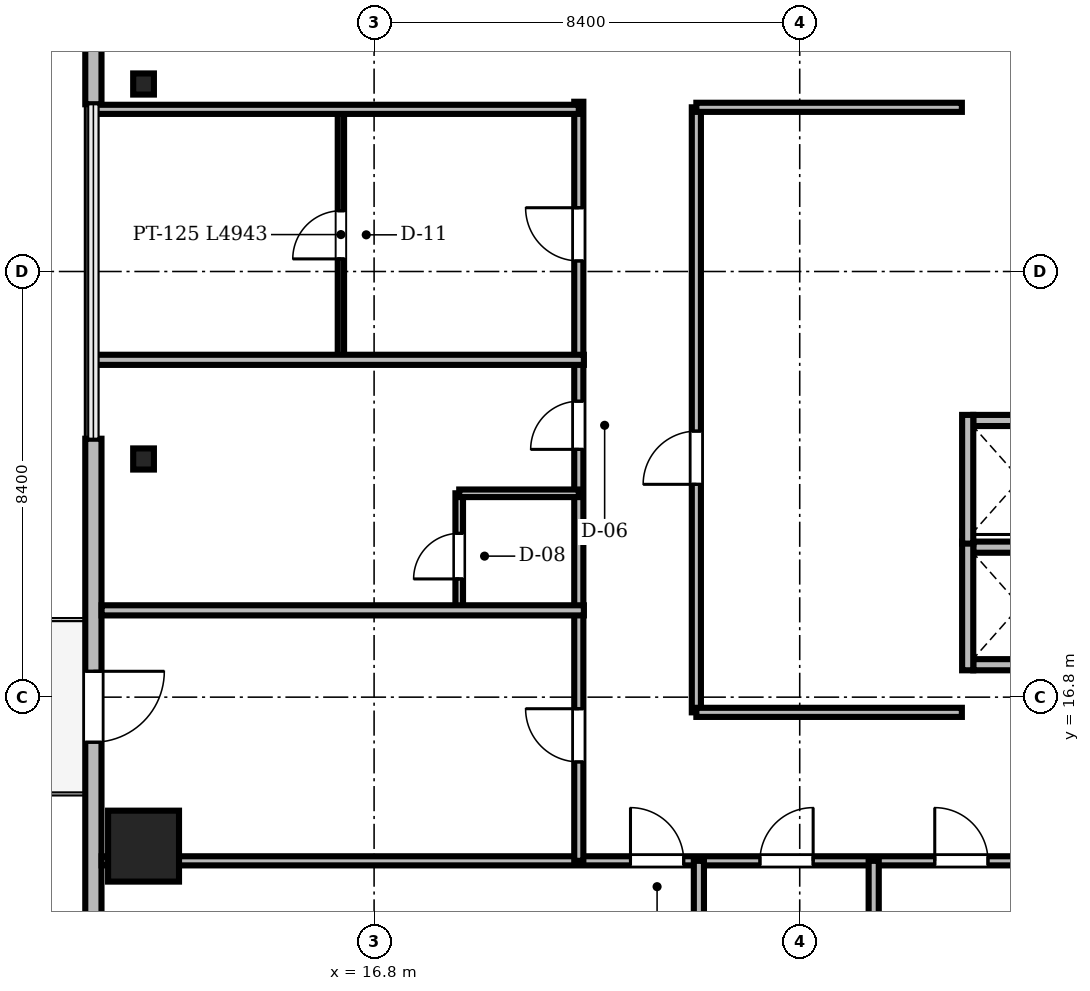
"""IFC4 building model, lengths in metres.
Left out: names, types, materials, properties, quantities, classifications, styles, units other than length and angle.
Written with IfcOpenShell. Run it as: python <this file> out.ifc"""

import sys

from ifc_helpers import new_model, si_unit, direction, frame, frame_2d, origin, origin_2d, place, context, subcontext, project, spatial, rectangle, i_section, extrude, source, transform, mapped, element, fill, save


model = new_model("IFC4")
c1 = context("Model", 3, precision=1e-05, world=origin(), true_north=direction((0.0, 1.0)))
c2 = subcontext(c1, "Body", "Model", "MODEL_VIEW")
j1 = project(units=[si_unit("LENGTHUNIT", "METRE"), si_unit("PLANEANGLEUNIT", "RADIAN")], contexts=[c1])
p1 = place(None, origin())
s1 = spatial("IfcSite", under=j1, at=p1, CompositionType="ELEMENT")
p2 = place(p1, origin())
s2 = spatial("IfcBuilding", under=s1, at=p2, CompositionType="ELEMENT")
p3 = place(p2, frame((0.0, 0.0, 222.3)))
s3 = spatial("IfcBuildingStorey", under=s2, at=p3, CompositionType="ELEMENT", Elevation=222.3)
m1 = source(origin(), c2, "Body", "SweptSolid", [
    extrude(rectangle(XDim=1.4, YDim=1.4, at=origin_2d()), origin(), (0.0, 0.0, 1.0), 3.53),
])
p4 = place(p3, frame((12.25, 13.86, 0.0), z_axis=(0.0, 0.0, 1.0), x_axis=(1.0, 0.0, 0.0)))
e1 = element("IfcColumn", 1, at=p4, inside=s3, PredefinedType="COLUMN", context=c2, shape_type="MappedRepresentation", body=[
    mapped(m1, transform((0.0, 0.0, 0.0), scale=1.0)),
])
m2 = source(origin(), c2, "Body", "SweptSolid", [
    extrude(i_section(OverallWidth=0.409, OverallDepth=0.417, WebThickness=0.021, FlangeThickness=0.033, FilletRadius=0.015, at=origin_2d()), origin(), (0.0, 0.0, 1.0), 3.53),
])
for number, where, z_axis, x_axis in (
    (2, (12.25, 28.9, 0.0), (0.0, 0.0, 1.0), (1.0, 0.0, 0.0)),
    (3, (12.25, 21.5, 0.0), (0.0, 0.0, 1.0), (1.0, 0.0, 0.0)),
):
    element("IfcColumn", number, at=place(p3, frame(where, z_axis=z_axis, x_axis=x_axis)), inside=s3, PredefinedType="COLUMN", context=c2, shape_type="MappedRepresentation", body=[
        mapped(m2, transform((0.0, 0.0, 0.0), scale=1.0)),
    ])
m3 = source(origin(), c2, "Body", "SweptSolid", [
    extrude(rectangle(XDim=15.6, YDim=0.32, at=frame_2d((7.8, 0.0))), origin(), (0.0, 0.0, 1.0), 3.53),
])
p5 = place(p3, frame((11.26, 44.1, 0.0), z_axis=(0.0, 0.0, 1.0), x_axis=(0.0, -1.0, 0.0)))
e4 = element("IfcWall", 4, at=p5, inside=s3, PredefinedType="SOLIDWALL", context=c2, shape_type="MappedRepresentation", body=[
    mapped(m3, transform((0.0, 0.0, 0.0), scale=1.0)),
])
m4 = source(origin(), c2, "Body", "SweptSolid", [
    extrude(rectangle(XDim=2.2, YDim=2.4, at=frame_2d((1.1, 1.2))), frame((0.0, 0.17, 0.0), z_axis=(0.0, -1.0, 0.0), x_axis=(1.0, 0.0, 0.0)), (0.0, 0.0, 1.0), 0.34),
])
p6 = place(p5, frame((3.005, 0.0, 0.72)))
e5 = element("IfcOpeningElement", 5, at=p6, cuts=e4, PredefinedType="OPENING", context=c2, shape_type="MappedRepresentation", body=[
    mapped(m4, transform((0.0, 0.0, 0.0), scale=1.0)),
])
m5 = source(origin(), c2, "Body", "SweptSolid", [
    extrude(rectangle(XDim=15.6, YDim=0.32, at=frame_2d((7.8, 0.0))), origin(), (0.0, 0.0, 1.0), 3.53),
])
p7 = place(p3, frame((11.26, 21.9, 0.0), z_axis=(0.0, 0.0, 1.0), x_axis=(0.0, -1.0, 0.0)))
e6 = element("IfcWall", 6, at=p7, inside=s3, PredefinedType="SOLIDWALL", context=c2, shape_type="MappedRepresentation", body=[
    mapped(m5, transform((0.0, 0.0, 0.0), scale=1.0)),
])
m6 = source(origin(), c2, "Body", "SweptSolid", [
    extrude(rectangle(XDim=1.4, YDim=2.3, at=frame_2d((0.7, 1.15))), frame((0.0, 0.17, 0.0), z_axis=(0.0, -1.0, 0.0), x_axis=(1.0, 0.0, 0.0)), (0.0, 0.0, 1.0), 0.34),
])
p8 = place(p7, frame((4.59, 0.0, 0.0)))
e7 = element("IfcOpeningElement", 7, at=p8, cuts=e6, PredefinedType="OPENING", context=c2, shape_type="MappedRepresentation", body=[
    mapped(m6, transform((0.0, 0.0, 0.0), scale=1.0)),
])
p9 = place(p7, frame((10.395, 0.0, 0.72)))
e8 = element("IfcOpeningElement", 8, at=p9, cuts=e6, PredefinedType="OPENING", context=c2, shape_type="MappedRepresentation", body=[
    mapped(m4, transform((0.0, 0.0, 0.0), scale=1.0)),
])
m7 = source(origin(), c2, "Body", "SweptSolid", [
    extrude(rectangle(XDim=1.85, YDim=0.22, at=frame_2d((0.925, 0.0))), origin(), (0.0, 0.0, 1.0), 2.972),
])
p10 = place(p3, frame((28.625, 17.44, 0.0), z_axis=(0.0, 0.0, 1.0), x_axis=(1.0, 0.0, 0.0)))
e9 = element("IfcWall", 9, at=p10, inside=s3, PredefinedType="SOLIDWALL", context=c2, shape_type="MappedRepresentation", body=[
    mapped(m7, transform((0.0, 0.0, 0.0), scale=1.0)),
])
m8 = source(origin(), c2, "Body", "SweptSolid", [
    extrude(rectangle(XDim=1.85, YDim=0.22, at=frame_2d((0.925, 0.0))), origin(), (0.0, 0.0, 1.0), 3.53),
])
p11 = place(p3, frame((28.625, 19.76, 0.0), z_axis=(0.0, 0.0, 1.0), x_axis=(1.0, 0.0, 0.0)))
e10 = element("IfcWall", 10, at=p11, inside=s3, PredefinedType="SOLIDWALL", context=c2, shape_type="MappedRepresentation", body=[
    mapped(m8, transform((0.0, 0.0, 0.0), scale=1.0)),
])
m9 = source(origin(), c2, "Body", "SweptSolid", [
    extrude(rectangle(XDim=2.54, YDim=0.22, at=frame_2d((1.27, 0.0))), origin(), (0.0, 0.0, 1.0), 2.972),
])
p12 = place(p3, frame((28.515, 17.33, 0.0), z_axis=(0.0, 0.0, 1.0), x_axis=(0.0, 1.0, 0.0)))
e11 = element("IfcWall", 11, at=p12, inside=s3, PredefinedType="SOLIDWALL", context=c2, shape_type="MappedRepresentation", body=[
    mapped(m9, transform((0.0, 0.0, 0.0), scale=1.0)),
])
p13 = place(p3, frame((28.625, 22.26, 0.0), z_axis=(0.0, 0.0, 1.0), x_axis=(1.0, 0.0, 0.0)))
e12 = element("IfcWall", 12, at=p13, inside=s3, PredefinedType="SOLIDWALL", context=c2, shape_type="MappedRepresentation", body=[
    mapped(m8, transform((0.0, 0.0, 0.0), scale=1.0)),
])
m10 = source(origin(), c2, "Body", "SweptSolid", [
    extrude(rectangle(XDim=2.54, YDim=0.22, at=frame_2d((1.27, 0.0))), origin(), (0.0, 0.0, 1.0), 3.53),
])
p14 = place(p3, frame((28.515, 19.83, 0.0), z_axis=(0.0, 0.0, 1.0), x_axis=(0.0, 1.0, 0.0)))
e13 = element("IfcWall", 13, at=p14, inside=s3, PredefinedType="SOLIDWALL", context=c2, shape_type="MappedRepresentation", body=[
    mapped(m10, transform((0.0, 0.0, 0.0), scale=1.0)),
])
m11 = source(origin(), c2, "Body", "SweptSolid", [
    extrude(rectangle(XDim=46.156, YDim=0.18, at=frame_2d((23.078, 0.0))), origin(), (0.0, 0.0, 1.0), 2.772),
])
p15 = place(p3, frame((11.422, 13.57, 0.0), z_axis=(0.0, 0.0, 1.0), x_axis=(1.0, 0.0, 0.0)))
e14 = element("IfcWall", 14, at=p15, inside=s3, PredefinedType="PARTITIONING", context=c2, shape_type="MappedRepresentation", body=[
    mapped(m11, transform((0.0, 0.0, 0.0), scale=1.0)),
])
m12 = source(origin(), c2, "Body", "SweptSolid", [
    extrude(rectangle(XDim=1.05, YDim=2.2, at=frame_2d((0.525, 1.1))), frame((0.0, 0.1, 0.0), z_axis=(0.0, -1.0, 0.0), x_axis=(1.0, 0.0, 0.0)), (0.0, 0.0, 1.0), 0.2),
])
p16 = place(p15, frame((10.438, 0.0, 0.0)))
e15 = element("IfcOpeningElement", 15, at=p16, cuts=e14, PredefinedType="OPENING", context=c2, shape_type="MappedRepresentation", body=[
    mapped(m12, transform((0.0, 0.0, 0.0), scale=1.0)),
])
p17 = place(p15, frame((12.993, 0.0, 0.0)))
e16 = element("IfcOpeningElement", 16, at=p17, cuts=e14, PredefinedType="OPENING", context=c2, shape_type="MappedRepresentation", body=[
    mapped(m12, transform((0.0, 0.0, 0.0), scale=1.0)),
])
p18 = place(p15, frame((16.443, 0.0, 0.0)))
e17 = element("IfcOpeningElement", 17, at=p18, cuts=e14, PredefinedType="OPENING", context=c2, shape_type="MappedRepresentation", body=[
    mapped(m12, transform((0.0, 0.0, 0.0), scale=1.0)),
])
p19 = place(p15, frame((20.121, 0.0, 0.0)))
e18 = element("IfcOpeningElement", 18, at=p19, cuts=e14, PredefinedType="OPENING", context=c2, shape_type="MappedRepresentation", body=[
    mapped(m12, transform((0.0, 0.0, 0.0), scale=1.0)),
])
p20 = place(p15, frame((24.124, 0.0, 0.0)))
e19 = element("IfcOpeningElement", 19, at=p20, cuts=e14, PredefinedType="OPENING", context=c2, shape_type="MappedRepresentation", body=[
    mapped(m12, transform((0.0, 0.0, 0.0), scale=1.0)),
])
p21 = place(p15, frame((29.261, 0.0, 0.0)))
e20 = element("IfcOpeningElement", 20, at=p21, cuts=e14, PredefinedType="OPENING", context=c2, shape_type="MappedRepresentation", body=[
    mapped(m12, transform((0.0, 0.0, 0.0), scale=1.0)),
])
p22 = place(p15, frame((34.113, 0.0, 0.0)))
e21 = element("IfcOpeningElement", 21, at=p22, cuts=e14, PredefinedType="OPENING", context=c2, shape_type="MappedRepresentation", body=[
    mapped(m12, transform((0.0, 0.0, 0.0), scale=1.0)),
])
p23 = place(p15, frame((37.498, 0.0, 0.0)))
e22 = element("IfcOpeningElement", 22, at=p23, cuts=e14, PredefinedType="OPENING", context=c2, shape_type="MappedRepresentation", body=[
    mapped(m12, transform((0.0, 0.0, 0.0), scale=1.0)),
])
m13 = source(origin(), c2, "Body", "SweptSolid", [
    extrude(rectangle(XDim=14.98, YDim=0.18, at=frame_2d((7.49, 0.0))), origin(), (0.0, 0.0, 1.0), 2.972),
])
p24 = place(p3, frame((20.84, 13.57, 0.0), z_axis=(0.0, 0.0, 1.0), x_axis=(0.0, 1.0, 0.0)))
e23 = element("IfcWall", 23, at=p24, inside=s3, PredefinedType="PARTITIONING", context=c2, shape_type="MappedRepresentation", body=[
    mapped(m13, transform((0.0, 0.0, 0.0), scale=1.0)),
])
p25 = place(p24, frame((1.952, 0.0, 0.0)))
e24 = element("IfcOpeningElement", 24, at=p25, cuts=e23, PredefinedType="OPENING", context=c2, shape_type="MappedRepresentation", body=[
    mapped(m12, transform((0.0, 0.0, 0.0), scale=1.0)),
])
m14 = source(origin(), c2, "Body", "SweptSolid", [
    extrude(rectangle(XDim=0.95, YDim=2.15, at=frame_2d((0.475, 1.075))), frame((0.0, 0.1, 0.0), z_axis=(0.0, -1.0, 0.0), x_axis=(1.0, 0.0, 0.0)), (0.0, 0.0, 1.0), 0.2),
])
p26 = place(p24, frame((8.12, 0.0, 0.0)))
e25 = element("IfcOpeningElement", 25, at=p26, cuts=e23, PredefinedType="OPENING", context=c2, shape_type="MappedRepresentation", body=[
    mapped(m14, transform((0.0, 0.0, 0.0), scale=1.0)),
])
p27 = place(p24, frame((11.838, 0.0, 0.0)))
e26 = element("IfcOpeningElement", 26, at=p27, cuts=e23, PredefinedType="OPENING", context=c2, shape_type="MappedRepresentation", body=[
    mapped(m12, transform((0.0, 0.0, 0.0), scale=1.0)),
])
m15 = source(origin(), c2, "Body", "SweptSolid", [
    extrude(rectangle(XDim=11.94, YDim=0.18, at=frame_2d((5.97, 0.0))), origin(), (0.0, 0.0, 1.0), 2.972),
])
p28 = place(p3, frame((23.16, 16.5, 0.0), z_axis=(0.0, 0.0, 1.0), x_axis=(0.0, 1.0, 0.0)))
e27 = element("IfcWall", 27, at=p28, inside=s3, PredefinedType="PARTITIONING", context=c2, shape_type="MappedRepresentation", body=[
    mapped(m15, transform((0.0, 0.0, 0.0), scale=1.0)),
])
p29 = place(p28, frame((4.5, 0.0, 0.0)))
e28 = element("IfcOpeningElement", 28, at=p29, cuts=e27, PredefinedType="OPENING", context=c2, shape_type="MappedRepresentation", body=[
    mapped(m12, transform((0.0, 0.0, 0.0), scale=1.0)),
])
m16 = source(origin(), c2, "Body", "SweptSolid", [
    extrude(rectangle(XDim=4.943, YDim=0.125, at=frame_2d((2.471, 0.0))), origin(), (0.0, 0.0, 1.0), 2.972),
])
p30 = place(p3, frame((16.145, 23.457, 0.0), z_axis=(0.0, 0.0, 1.0), x_axis=(0.0, 1.0, 0.0)))
e29 = element("IfcWall", 29, at=p30, inside=s3, PredefinedType="PARTITIONING", context=c2, shape_type="MappedRepresentation", body=[
    mapped(m16, transform((0.0, 0.0, 0.0), scale=1.0)),
])
m17 = source(origin(), c2, "Body", "SweptSolid", [
    extrude(rectangle(XDim=0.95, YDim=2.15, at=frame_2d((0.475, 1.075))), frame((0.0, 0.073, 0.0), z_axis=(0.0, -1.0, 0.0), x_axis=(1.0, 0.0, 0.0)), (0.0, 0.0, 1.0), 0.145),
])
p31 = place(p30, frame((1.992, 0.0, 0.0)))
e30 = element("IfcOpeningElement", 30, at=p31, cuts=e29, PredefinedType="OPENING", context=c2, shape_type="MappedRepresentation", body=[
    mapped(m17, transform((0.0, 0.0, 0.0), scale=1.0)),
])
m18 = source(origin(), c2, "Body", "SweptSolid", [
    extrude(rectangle(XDim=2.29, YDim=0.15, at=frame_2d((1.145, 0.0))), origin(), (0.0, 0.0, 1.0), 2.972),
])
p32 = place(p3, frame((18.48, 18.533, 0.0), z_axis=(0.0, 0.0, 1.0), x_axis=(0.0, 1.0, 0.0)))
e31 = element("IfcWall", 31, at=p32, inside=s3, PredefinedType="PARTITIONING", context=c2, shape_type="MappedRepresentation", body=[
    mapped(m18, transform((0.0, 0.0, 0.0), scale=1.0)),
])
m19 = source(origin(), c2, "Body", "SweptSolid", [
    extrude(rectangle(XDim=0.9, YDim=2.1, at=frame_2d((0.45, 1.05))), frame((0.0, 0.085, 0.0), z_axis=(0.0, -1.0, 0.0), x_axis=(1.0, 0.0, 0.0)), (0.0, 0.0, 1.0), 0.17),
])
p33 = place(p32, frame((0.6, 0.0, 0.0)))
e32 = element("IfcOpeningElement", 32, at=p33, cuts=e31, PredefinedType="OPENING", context=c2, shape_type="MappedRepresentation", body=[
    mapped(m19, transform((0.0, 0.0, 0.0), scale=1.0)),
])
m20 = source(origin(), c2, "Body", "SweptSolid", [
    extrude(rectangle(XDim=11.448, YDim=0.2, at=frame_2d((5.724, 0.0))), origin(), (0.0, 0.0, 1.0), 2.772),
])
for number, where, z_axis, x_axis in (
    (33, (23.21, 2.122, 0.0), (0.0, 0.0, 1.0), (0.0, 1.0, 0.0)),
    (34, (26.66, 2.122, 0.0), (0.0, 0.0, 1.0), (0.0, 1.0, 0.0)),
):
    element("IfcWall", number, at=place(p3, frame(where, z_axis=z_axis, x_axis=x_axis)), inside=s3, PredefinedType="PARTITIONING", context=c2, shape_type="MappedRepresentation", body=[
        mapped(m20, transform((0.0, 0.0, 0.0), scale=1.0)),
    ])
m21 = source(origin(), c2, "Body", "SweptSolid", [
    extrude(rectangle(XDim=9.518, YDim=0.2, at=frame_2d((4.759, 0.0))), origin(), (0.0, 0.0, 1.0), 2.772),
])
p34 = place(p3, frame((11.422, 18.513, 0.0), z_axis=(0.0, 0.0, 1.0), x_axis=(1.0, 0.0, 0.0)))
e35 = element("IfcWall", 35, at=p34, inside=s3, PredefinedType="PARTITIONING", context=c2, shape_type="MappedRepresentation", body=[
    mapped(m21, transform((0.0, 0.0, 0.0), scale=1.0)),
])
m22 = source(origin(), c2, "Body", "SweptSolid", [
    extrude(rectangle(XDim=9.71, YDim=0.2, at=frame_2d((4.855, 0.0))), origin(), (0.0, 0.0, 1.0), 2.772),
])
p35 = place(p3, frame((11.23, 23.457, 0.0), z_axis=(0.0, 0.0, 1.0), x_axis=(1.0, 0.0, 0.0)))
e36 = element("IfcWall", 36, at=p35, inside=s3, PredefinedType="PARTITIONING", context=c2, shape_type="MappedRepresentation", body=[
    mapped(m22, transform((0.0, 0.0, 0.0), scale=1.0)),
])
m23 = source(origin(), c2, "Body", "SweptSolid", [
    extrude(rectangle(XDim=9.61, YDim=0.18, at=frame_2d((4.805, 0.0))), origin(), (0.0, 0.0, 1.0), 2.772),
])
p36 = place(p3, frame((11.23, 28.4, 0.0), z_axis=(0.0, 0.0, 1.0), x_axis=(1.0, 0.0, 0.0)))
e37 = element("IfcWall", 37, at=p36, inside=s3, PredefinedType="PARTITIONING", context=c2, shape_type="MappedRepresentation", body=[
    mapped(m23, transform((0.0, 0.0, 0.0), scale=1.0)),
])
m24 = source(origin(), c2, "Body", "SweptSolid", [
    extrude(rectangle(XDim=5.24, YDim=0.18, at=frame_2d((2.62, 0.0))), origin(), (0.0, 0.0, 1.0), 3.53),
])
for number, where, z_axis, x_axis in (
    (38, (23.16, 16.5, 0.0), (0.0, 0.0, 1.0), (1.0, 0.0, 0.0)),
    (39, (23.16, 28.44, 0.0), (0.0, 0.0, 1.0), (1.0, 0.0, 0.0)),
):
    element("IfcWall", number, at=place(p3, frame(where, z_axis=z_axis, x_axis=x_axis)), inside=s3, PredefinedType="PARTITIONING", context=c2, shape_type="MappedRepresentation", body=[
        mapped(m24, transform((0.0, 0.0, 0.0), scale=1.0)),
    ])
m25 = source(origin(), c2, "Body", "SweptSolid", [
    extrude(rectangle(XDim=2.36, YDim=0.15, at=frame_2d((1.18, 0.0))), origin(), (0.0, 0.0, 1.0), 3.53),
])
p37 = place(p3, frame((18.48, 20.823, 0.0), z_axis=(0.0, 0.0, 1.0), x_axis=(1.0, 0.0, 0.0)))
e40 = element("IfcWall", 40, at=p37, inside=s3, PredefinedType="PARTITIONING", context=c2, shape_type="MappedRepresentation", body=[
    mapped(m25, transform((0.0, 0.0, 0.0), scale=1.0)),
])
m26 = source(origin(), c2, "Body", "SweptSolid", [
    extrude(rectangle(XDim=1.4, YDim=2.3, at=frame_2d((0.7, 1.15))), frame((0.0, 0.025, 0.0), z_axis=(0.0, -1.0, 0.0), x_axis=(1.0, 0.0, 0.0)), (0.0, 0.0, 1.0), 0.05),
])
p38 = place(p8, frame((1.4, 0.0, 0.0), z_axis=(0.0, 0.0, 1.0), x_axis=(-1.0, 0.0, 0.0)))
e41 = element("IfcDoor", 41, at=p38, inside=s3, OperationType="DOUBLE_DOOR_SLIDING", PredefinedType="DOOR", context=c2, shape_type="MappedRepresentation", body=[
    mapped(m26, transform((0.0, 0.0, 0.0), scale=1.0)),
])
fill(e7, e41)
m27 = source(origin(), c2, "Body", "SweptSolid", [
    extrude(rectangle(XDim=1.05, YDim=2.2, at=frame_2d((0.525, 1.1))), frame((0.0, 0.025, 0.0), z_axis=(0.0, -1.0, 0.0), x_axis=(1.0, 0.0, 0.0)), (0.0, 0.0, 1.0), 0.05),
])
p39 = place(p16, origin())
e42 = element("IfcDoor", 42, at=p39, inside=s3, OperationType="SINGLE_SWING_LEFT", PredefinedType="DOOR", context=c2, shape_type="MappedRepresentation", body=[
    mapped(m27, transform((0.0, 0.0, 0.0), scale=1.0)),
])
fill(e15, e42)
p40 = place(p17, origin())
e43 = element("IfcDoor", 43, at=p40, inside=s3, OperationType="SINGLE_SWING_RIGHT", PredefinedType="DOOR", context=c2, shape_type="MappedRepresentation", body=[
    mapped(m27, transform((0.0, 0.0, 0.0), scale=1.0)),
])
fill(e16, e43)
p41 = place(p18, origin())
e44 = element("IfcDoor", 44, at=p41, inside=s3, OperationType="SINGLE_SWING_LEFT", PredefinedType="DOOR", context=c2, shape_type="MappedRepresentation", body=[
    mapped(m27, transform((0.0, 0.0, 0.0), scale=1.0)),
])
fill(e17, e44)
p42 = place(p25, origin())
e45 = element("IfcDoor", 45, at=p42, inside=s3, OperationType="SINGLE_SWING_RIGHT", PredefinedType="DOOR", context=c2, shape_type="MappedRepresentation", body=[
    mapped(m27, transform((0.0, 0.0, 0.0), scale=1.0)),
])
fill(e24, e45)
m28 = source(origin(), c2, "Body", "SweptSolid", [
    extrude(rectangle(XDim=0.95, YDim=2.15, at=frame_2d((0.475, 1.075))), frame((0.0, 0.025, 0.0), z_axis=(0.0, -1.0, 0.0), x_axis=(1.0, 0.0, 0.0)), (0.0, 0.0, 1.0), 0.05),
])
p43 = place(p26, origin())
e46 = element("IfcDoor", 46, at=p43, inside=s3, OperationType="SINGLE_SWING_LEFT", PredefinedType="DOOR", context=c2, shape_type="MappedRepresentation", body=[
    mapped(m28, transform((0.0, 0.0, 0.0), scale=1.0)),
])
fill(e25, e46)
p44 = place(p27, origin())
e47 = element("IfcDoor", 47, at=p44, inside=s3, OperationType="SINGLE_SWING_RIGHT", PredefinedType="DOOR", context=c2, shape_type="MappedRepresentation", body=[
    mapped(m27, transform((0.0, 0.0, 0.0), scale=1.0)),
])
fill(e26, e47)
p45 = place(p29, origin())
e48 = element("IfcDoor", 48, at=p45, inside=s3, OperationType="SINGLE_SWING_LEFT", PredefinedType="DOOR", context=c2, shape_type="MappedRepresentation", body=[
    mapped(m27, transform((0.0, 0.0, 0.0), scale=1.0)),
])
fill(e28, e48)
p46 = place(p31, origin())
e49 = element("IfcDoor", 49, at=p46, inside=s3, OperationType="SINGLE_SWING_LEFT", PredefinedType="DOOR", context=c2, shape_type="MappedRepresentation", body=[
    mapped(m28, transform((0.0, 0.0, 0.0), scale=1.0)),
])
fill(e30, e49)
m29 = source(origin(), c2, "Body", "SweptSolid", [
    extrude(rectangle(XDim=0.9, YDim=2.1, at=frame_2d((0.45, 1.05))), frame((0.0, 0.025, 0.0), z_axis=(0.0, -1.0, 0.0), x_axis=(1.0, 0.0, 0.0)), (0.0, 0.0, 1.0), 0.05),
])
p47 = place(p33, origin())
e50 = element("IfcDoor", 50, at=p47, inside=s3, OperationType="SINGLE_SWING_LEFT", PredefinedType="DOOR", context=c2, shape_type="MappedRepresentation", body=[
    mapped(m29, transform((0.0, 0.0, 0.0), scale=1.0)),
])
fill(e32, e50)
save(model, sys.argv[1])
